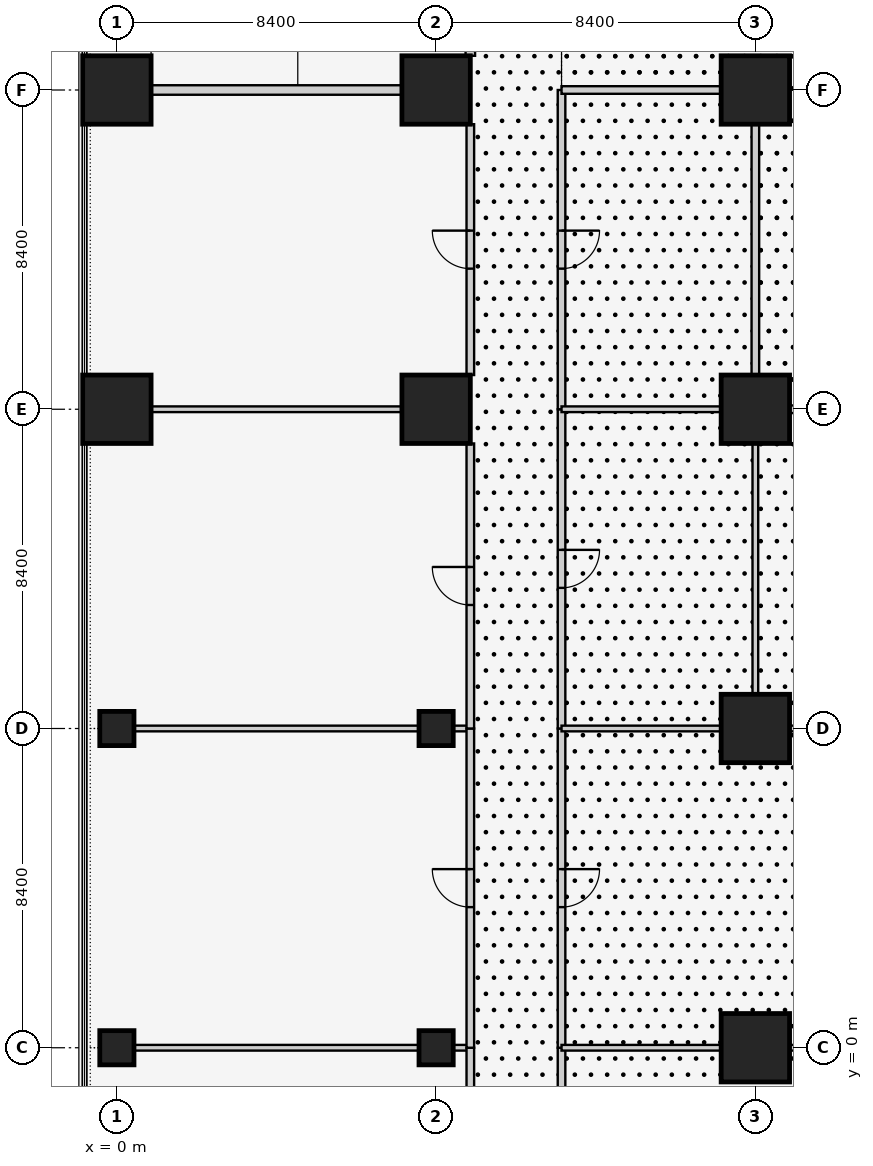
"""IFC4 building model, lengths in metres.
Left out: names, types, materials, properties, quantities, classifications, styles, units other than length and angle.
Written with IfcOpenShell. Run it as: python <this file> out.ifc"""

import sys

from ifc_helpers import new_model, si_unit, direction, frame, frame_2d, origin, origin_2d, place, context, subcontext, project, spatial, rectangle, extrude, element, fill, save


model = new_model("IFC4")
c1 = context("Model", 3, precision=1e-05, world=origin(), true_north=direction((0.0, 1.0)))
c2 = subcontext(c1, "Body", "Model", "MODEL_VIEW")
j1 = project(units=[si_unit("LENGTHUNIT", "METRE"), si_unit("PLANEANGLEUNIT", "RADIAN")], contexts=[c1])
p1 = place(None, origin())
s1 = spatial("IfcSite", under=j1, at=p1, CompositionType="ELEMENT")
p2 = place(p1, origin())
s2 = spatial("IfcBuilding", under=s1, at=p2, CompositionType="ELEMENT")
p3 = place(p2, frame((0.0, 0.0, 6.0)))
s3 = spatial("IfcBuildingStorey", under=s2, at=p3, CompositionType="ELEMENT", Elevation=6.0)
for number, where, z_axis, x_axis in (
    (1, (0.0, 0.0, 0.0), (0.0, 0.0, 1.0), (1.0, 0.0, 0.0)),
    (2, (0.0, 8.4, 0.0), (0.0, 0.0, 1.0), (1.0, 0.0, 0.0)),
):
    element("IfcColumn", number, at=place(p3, frame(where, z_axis=z_axis, x_axis=x_axis)), inside=s3, PredefinedType="COLUMN", context=c2, shape_type="SweptSolid", body=[
        extrude(rectangle(XDim=0.9, YDim=0.9, at=origin_2d()), origin(), (0.0, 0.0, 1.0), 4.5),
    ])
for number, where, z_axis, x_axis in (
    (3, (0.0, 16.8, 0.0), (0.0, 0.0, 1.0), (1.0, 0.0, 0.0)),
    (4, (0.0, 25.2, 0.0), (0.0, 0.0, 1.0), (1.0, 0.0, 0.0)),
):
    element("IfcColumn", number, at=place(p3, frame(where, z_axis=z_axis, x_axis=x_axis)), inside=s3, PredefinedType="COLUMN", context=c2, shape_type="SweptSolid", body=[
        extrude(rectangle(XDim=1.8, YDim=1.8, at=origin_2d()), origin(), (0.0, 0.0, 1.0), 4.5),
    ])
for number, where, z_axis, x_axis in (
    (5, (8.4, 0.0, 0.0), (0.0, 0.0, 1.0), (1.0, 0.0, 0.0)),
    (6, (8.4, 8.4, 0.0), (0.0, 0.0, 1.0), (1.0, 0.0, 0.0)),
):
    element("IfcColumn", number, at=place(p3, frame(where, z_axis=z_axis, x_axis=x_axis)), inside=s3, PredefinedType="COLUMN", context=c2, shape_type="SweptSolid", body=[
        extrude(rectangle(XDim=0.9, YDim=0.9, at=origin_2d()), origin(), (0.0, 0.0, 1.0), 4.5),
    ])
for number, where, z_axis, x_axis in (
    (7, (8.4, 16.8, 0.0), (0.0, 0.0, 1.0), (1.0, 0.0, 0.0)),
    (8, (8.4, 25.2, 0.0), (0.0, 0.0, 1.0), (1.0, 0.0, 0.0)),
    (9, (16.8, 0.0, 0.0), (0.0, 0.0, 1.0), (1.0, 0.0, 0.0)),
    (10, (16.8, 8.4, 0.0), (0.0, 0.0, 1.0), (1.0, 0.0, 0.0)),
    (11, (16.8, 16.8, 0.0), (0.0, 0.0, 1.0), (1.0, 0.0, 0.0)),
    (12, (16.8, 25.2, 0.0), (0.0, 0.0, 1.0), (1.0, 0.0, 0.0)),
):
    element("IfcColumn", number, at=place(p3, frame(where, z_axis=z_axis, x_axis=x_axis)), inside=s3, PredefinedType="COLUMN", context=c2, shape_type="SweptSolid", body=[
        extrude(rectangle(XDim=1.8, YDim=1.8, at=origin_2d()), origin(), (0.0, 0.0, 1.0), 4.5),
    ])
p4 = place(p3, frame((7.5, 25.2, 0.0), z_axis=(0.0, 0.0, 1.0), x_axis=(-1.0, 0.0, 0.0)))
e13 = element("IfcWall", 13, at=p4, inside=s3, PredefinedType="SOLIDWALL", context=c2, shape_type="SweptSolid", body=[
    extrude(rectangle(XDim=6.6, YDim=0.25, at=frame_2d((3.3, 0.0))), origin(), (0.0, 0.0, 1.0), 3.543),
])
p5 = place(p3, frame((9.3, 32.7, 0.0), z_axis=(0.0, 0.0, 1.0), x_axis=(0.0, -1.0, 0.0)))
e14 = element("IfcWall", 14, at=p5, inside=s3, PredefinedType="SOLIDWALL", context=c2, shape_type="SweptSolid", body=[
    extrude(rectangle(XDim=6.6, YDim=0.25, at=frame_2d((3.3, 0.0))), origin(), (0.0, 0.0, 1.0), 4.3),
])
p6 = place(p5, frame((2.0, 0.0, 0.0)))
e15 = element("IfcOpeningElement", 15, at=p6, cuts=e14, PredefinedType="OPENING", context=c2, shape_type="SweptSolid", body=[
    extrude(rectangle(XDim=2.6, YDim=2.4, at=frame_2d((1.3, 1.2))), frame((0.0, 0.135, 0.0), z_axis=(0.0, -1.0, 0.0), x_axis=(1.0, 0.0, 0.0)), (0.0, 0.0, 1.0), 0.27),
])
p7 = place(p3, frame((0.45, 0.0, 0.0), z_axis=(0.0, 0.0, 1.0), x_axis=(1.0, 0.0, 0.0)))
e16 = element("IfcWall", 16, at=p7, inside=s3, PredefinedType="PARTITIONING", context=c2, shape_type="SweptSolid", body=[
    extrude(rectangle(XDim=7.5, YDim=0.15, at=frame_2d((3.75, 0.0))), origin(), (0.0, 0.0, 1.0), 3.543),
])
p8 = place(p3, frame((8.85, 0.0, 0.0), z_axis=(0.0, 0.0, 1.0), x_axis=(1.0, 0.0, 0.0)))
e17 = element("IfcWall", 17, at=p8, inside=s3, PredefinedType="PARTITIONING", context=c2, shape_type="SweptSolid", body=[
    extrude(rectangle(XDim=0.45, YDim=0.15, at=frame_2d((0.225, 0.0))), origin(), (0.0, 0.0, 1.0), 3.543),
])
p9 = place(p3, frame((9.3, 0.0, 0.0), z_axis=(0.0, 0.0, 1.0), x_axis=(0.0, -1.0, 0.0)))
e18 = element("IfcWall", 18, at=p9, inside=s3, PredefinedType="PARTITIONING", context=c2, shape_type="SweptSolid", body=[
    extrude(rectangle(XDim=8.4, YDim=0.2, at=frame_2d((4.2, 0.0))), origin(), (0.0, 0.0, 1.0), 4.3),
])
p10 = place(p9, frame((3.7, 0.0, 0.0)))
e19 = element("IfcOpeningElement", 19, at=p10, cuts=e18, PredefinedType="OPENING", context=c2, shape_type="SweptSolid", body=[
    extrude(rectangle(XDim=1.0, YDim=2.1, at=frame_2d((0.5, 1.05))), frame((0.0, 0.11, 0.0), z_axis=(0.0, -1.0, 0.0), x_axis=(1.0, 0.0, 0.0)), (0.0, 0.0, 1.0), 0.22),
])
p11 = place(p3, frame((0.45, 8.4, 0.0), z_axis=(0.0, 0.0, 1.0), x_axis=(1.0, 0.0, 0.0)))
e20 = element("IfcWall", 20, at=p11, inside=s3, PredefinedType="PARTITIONING", context=c2, shape_type="SweptSolid", body=[
    extrude(rectangle(XDim=7.5, YDim=0.15, at=frame_2d((3.75, 0.0))), origin(), (0.0, 0.0, 1.0), 3.543),
])
p12 = place(p3, frame((8.85, 8.4, 0.0), z_axis=(0.0, 0.0, 1.0), x_axis=(1.0, 0.0, 0.0)))
e21 = element("IfcWall", 21, at=p12, inside=s3, PredefinedType="PARTITIONING", context=c2, shape_type="SweptSolid", body=[
    extrude(rectangle(XDim=0.45, YDim=0.15, at=frame_2d((0.225, 0.0))), origin(), (0.0, 0.0, 1.0), 3.543),
])
p13 = place(p3, frame((9.3, 8.4, 0.0), z_axis=(0.0, 0.0, 1.0), x_axis=(0.0, -1.0, 0.0)))
e22 = element("IfcWall", 22, at=p13, inside=s3, PredefinedType="PARTITIONING", context=c2, shape_type="SweptSolid", body=[
    extrude(rectangle(XDim=8.4, YDim=0.2, at=frame_2d((4.2, 0.0))), origin(), (0.0, 0.0, 1.0), 4.3),
])
p14 = place(p13, frame((3.7, 0.0, 0.0)))
e23 = element("IfcOpeningElement", 23, at=p14, cuts=e22, PredefinedType="OPENING", context=c2, shape_type="SweptSolid", body=[
    extrude(rectangle(XDim=1.0, YDim=2.1, at=frame_2d((0.5, 1.05))), frame((0.0, 0.11, 0.0), z_axis=(0.0, -1.0, 0.0), x_axis=(1.0, 0.0, 0.0)), (0.0, 0.0, 1.0), 0.22),
])
p15 = place(p3, frame((0.9, 16.8, 0.0), z_axis=(0.0, 0.0, 1.0), x_axis=(1.0, 0.0, 0.0)))
e24 = element("IfcWall", 24, at=p15, inside=s3, PredefinedType="PARTITIONING", context=c2, shape_type="SweptSolid", body=[
    extrude(rectangle(XDim=6.6, YDim=0.15, at=frame_2d((3.3, 0.0))), origin(), (0.0, 0.0, 1.0), 3.543),
])
p16 = place(p3, frame((9.3, 15.9, 0.0), z_axis=(0.0, 0.0, 1.0), x_axis=(0.0, -1.0, 0.0)))
e25 = element("IfcWall", 25, at=p16, inside=s3, PredefinedType="PARTITIONING", context=c2, shape_type="SweptSolid", body=[
    extrude(rectangle(XDim=7.5, YDim=0.2, at=frame_2d((3.75, 0.0))), origin(), (0.0, 0.0, 1.0), 4.3),
])
p17 = place(p16, frame((3.25, 0.0, 0.0)))
e26 = element("IfcOpeningElement", 26, at=p17, cuts=e25, PredefinedType="OPENING", context=c2, shape_type="SweptSolid", body=[
    extrude(rectangle(XDim=1.0, YDim=2.1, at=frame_2d((0.5, 1.05))), frame((0.0, 0.11, 0.0), z_axis=(0.0, -1.0, 0.0), x_axis=(1.0, 0.0, 0.0)), (0.0, 0.0, 1.0), 0.22),
])
p18 = place(p3, frame((9.3, 24.3, 0.0), z_axis=(0.0, 0.0, 1.0), x_axis=(0.0, -1.0, 0.0)))
e27 = element("IfcWall", 27, at=p18, inside=s3, PredefinedType="PARTITIONING", context=c2, shape_type="SweptSolid", body=[
    extrude(rectangle(XDim=6.6, YDim=0.2, at=frame_2d((3.3, 0.0))), origin(), (0.0, 0.0, 1.0), 4.3),
])
p19 = place(p18, frame((2.8, 0.0, 0.0)))
e28 = element("IfcOpeningElement", 28, at=p19, cuts=e27, PredefinedType="OPENING", context=c2, shape_type="SweptSolid", body=[
    extrude(rectangle(XDim=1.0, YDim=2.1, at=frame_2d((0.5, 1.05))), frame((0.0, 0.11, 0.0), z_axis=(0.0, -1.0, 0.0), x_axis=(1.0, 0.0, 0.0)), (0.0, 0.0, 1.0), 0.22),
])
p20 = place(p3, frame((11.7, 0.0, 0.0), z_axis=(0.0, 0.0, 1.0), x_axis=(0.0, -1.0, 0.0)))
e29 = element("IfcWall", 29, at=p20, inside=s3, PredefinedType="PARTITIONING", context=c2, shape_type="SweptSolid", body=[
    extrude(rectangle(XDim=5.1, YDim=0.2, at=frame_2d((2.55, 0.0))), origin(), (0.0, 0.0, 1.0), 4.3),
])
p21 = place(p3, frame((11.7, 8.4, 0.0), z_axis=(0.0, 0.0, 1.0), x_axis=(0.0, -1.0, 0.0)))
e30 = element("IfcWall", 30, at=p21, inside=s3, PredefinedType="PARTITIONING", context=c2, shape_type="SweptSolid", body=[
    extrude(rectangle(XDim=8.4, YDim=0.2, at=frame_2d((4.2, 0.0))), origin(), (0.0, 0.0, 1.0), 4.3),
])
p22 = place(p21, frame((3.7, 0.0, 0.0)))
e31 = element("IfcOpeningElement", 31, at=p22, cuts=e30, PredefinedType="OPENING", context=c2, shape_type="SweptSolid", body=[
    extrude(rectangle(XDim=1.0, YDim=2.1, at=frame_2d((0.5, 1.05))), frame((0.0, 0.11, 0.0), z_axis=(0.0, -1.0, 0.0), x_axis=(1.0, 0.0, 0.0)), (0.0, 0.0, 1.0), 0.22),
])
p23 = place(p3, frame((11.7, 16.8, 0.0), z_axis=(0.0, 0.0, 1.0), x_axis=(0.0, -1.0, 0.0)))
e32 = element("IfcWall", 32, at=p23, inside=s3, PredefinedType="PARTITIONING", context=c2, shape_type="SweptSolid", body=[
    extrude(rectangle(XDim=8.4, YDim=0.2, at=frame_2d((4.2, 0.0))), origin(), (0.0, 0.0, 1.0), 4.3),
])
p24 = place(p23, frame((3.7, 0.0, 0.0)))
e33 = element("IfcOpeningElement", 33, at=p24, cuts=e32, PredefinedType="OPENING", context=c2, shape_type="SweptSolid", body=[
    extrude(rectangle(XDim=1.0, YDim=2.1, at=frame_2d((0.5, 1.05))), frame((0.0, 0.11, 0.0), z_axis=(0.0, -1.0, 0.0), x_axis=(1.0, 0.0, 0.0)), (0.0, 0.0, 1.0), 0.22),
])
p25 = place(p3, frame((11.7, 25.2, 0.0), z_axis=(0.0, 0.0, 1.0), x_axis=(0.0, -1.0, 0.0)))
e34 = element("IfcWall", 34, at=p25, inside=s3, PredefinedType="PARTITIONING", context=c2, shape_type="SweptSolid", body=[
    extrude(rectangle(XDim=8.4, YDim=0.2, at=frame_2d((4.2, 0.0))), origin(), (0.0, 0.0, 1.0), 4.3),
])
p26 = place(p25, frame((3.7, 0.0, 0.0)))
e35 = element("IfcOpeningElement", 35, at=p26, cuts=e34, PredefinedType="OPENING", context=c2, shape_type="SweptSolid", body=[
    extrude(rectangle(XDim=1.0, YDim=2.1, at=frame_2d((0.5, 1.05))), frame((0.0, 0.11, 0.0), z_axis=(0.0, -1.0, 0.0), x_axis=(1.0, 0.0, 0.0)), (0.0, 0.0, 1.0), 0.22),
])
p27 = place(p3, frame((24.3, 16.8, 0.0), z_axis=(0.0, 0.0, 1.0), x_axis=(-1.0, 0.0, 0.0)))
e36 = element("IfcWall", 36, at=p27, inside=s3, PredefinedType="PARTITIONING", context=c2, shape_type="SweptSolid", body=[
    extrude(rectangle(XDim=6.6, YDim=0.2, at=frame_2d((3.3, 0.0))), origin(), (0.0, 0.0, 1.0), 3.543),
])
p28 = place(p3, frame((15.9, 25.2, 0.0), z_axis=(0.0, 0.0, 1.0), x_axis=(-1.0, 0.0, 0.0)))
e37 = element("IfcWall", 37, at=p28, inside=s3, PredefinedType="PARTITIONING", context=c2, shape_type="SweptSolid", body=[
    extrude(rectangle(XDim=4.2, YDim=0.2, at=frame_2d((2.1, 0.0))), origin(), (0.0, 0.0, 1.0), 3.543),
])
p29 = place(p3, frame((16.8, 17.7, 0.0), z_axis=(0.0, 0.0, 1.0), x_axis=(0.0, 1.0, 0.0)))
e38 = element("IfcWall", 38, at=p29, inside=s3, PredefinedType="PARTITIONING", context=c2, shape_type="SweptSolid", body=[
    extrude(rectangle(XDim=6.6, YDim=0.2, at=frame_2d((3.3, 0.0))), origin(), (0.0, 0.0, 1.0), 3.543),
])
p30 = place(p3, frame((11.7, 0.0, 0.0), z_axis=(0.0, 0.0, 1.0), x_axis=(1.0, 0.0, 0.0)))
e39 = element("IfcWall", 39, at=p30, inside=s3, PredefinedType="PARTITIONING", context=c2, shape_type="SweptSolid", body=[
    extrude(rectangle(XDim=4.2, YDim=0.15, at=frame_2d((2.1, 0.0))), origin(), (0.0, 0.0, 1.0), 3.543),
])
p31 = place(p3, frame((17.7, 0.0, 0.0), z_axis=(0.0, 0.0, 1.0), x_axis=(1.0, 0.0, 0.0)))
e40 = element("IfcWall", 40, at=p31, inside=s3, PredefinedType="PARTITIONING", context=c2, shape_type="SweptSolid", body=[
    extrude(rectangle(XDim=6.6, YDim=0.15, at=frame_2d((3.3, 0.0))), origin(), (0.0, 0.0, 1.0), 3.543),
])
p32 = place(p3, frame((11.7, 8.4, 0.0), z_axis=(0.0, 0.0, 1.0), x_axis=(1.0, 0.0, 0.0)))
e41 = element("IfcWall", 41, at=p32, inside=s3, PredefinedType="PARTITIONING", context=c2, shape_type="SweptSolid", body=[
    extrude(rectangle(XDim=4.2, YDim=0.15, at=frame_2d((2.1, 0.0))), origin(), (0.0, 0.0, 1.0), 3.543),
])
p33 = place(p3, frame((17.7, 8.4, 0.0), z_axis=(0.0, 0.0, 1.0), x_axis=(1.0, 0.0, 0.0)))
e42 = element("IfcWall", 42, at=p33, inside=s3, PredefinedType="PARTITIONING", context=c2, shape_type="SweptSolid", body=[
    extrude(rectangle(XDim=6.6, YDim=0.15, at=frame_2d((3.3, 0.0))), origin(), (0.0, 0.0, 1.0), 3.543),
])
p34 = place(p3, frame((16.8, 15.9, 0.0), z_axis=(0.0, 0.0, 1.0), x_axis=(0.0, -1.0, 0.0)))
e43 = element("IfcWall", 43, at=p34, inside=s3, PredefinedType="PARTITIONING", context=c2, shape_type="SweptSolid", body=[
    extrude(rectangle(XDim=6.6, YDim=0.15, at=frame_2d((3.3, 0.0))), origin(), (0.0, 0.0, 1.0), 3.543),
])
p35 = place(p3, frame((11.7, 16.8, 0.0), z_axis=(0.0, 0.0, 1.0), x_axis=(1.0, 0.0, 0.0)))
e44 = element("IfcWall", 44, at=p35, inside=s3, PredefinedType="PARTITIONING", context=c2, shape_type="SweptSolid", body=[
    extrude(rectangle(XDim=4.2, YDim=0.15, at=frame_2d((2.1, 0.0))), origin(), (0.0, 0.0, 1.0), 3.543),
])
p36 = place(p14, frame((1.0, 0.0, 0.0), z_axis=(0.0, 0.0, 1.0), x_axis=(-1.0, 0.0, 0.0)))
e45 = element("IfcDoor", 45, at=p36, inside=s3, OperationType="SINGLE_SWING_RIGHT", PredefinedType="DOOR", context=c2, shape_type="SweptSolid", body=[
    extrude(rectangle(XDim=1.0, YDim=2.1, at=frame_2d((0.5, 1.05))), frame((0.0, 0.025, 0.0), z_axis=(0.0, -1.0, 0.0), x_axis=(1.0, 0.0, 0.0)), (0.0, 0.0, 1.0), 0.05),
])
fill(e23, e45)
p37 = place(p17, frame((1.0, 0.0, 0.0), z_axis=(0.0, 0.0, 1.0), x_axis=(-1.0, 0.0, 0.0)))
e46 = element("IfcDoor", 46, at=p37, inside=s3, OperationType="SINGLE_SWING_RIGHT", PredefinedType="DOOR", context=c2, shape_type="SweptSolid", body=[
    extrude(rectangle(XDim=1.0, YDim=2.1, at=frame_2d((0.5, 1.05))), frame((0.0, 0.025, 0.0), z_axis=(0.0, -1.0, 0.0), x_axis=(1.0, 0.0, 0.0)), (0.0, 0.0, 1.0), 0.05),
])
fill(e26, e46)
p38 = place(p19, frame((1.0, 0.0, 0.0), z_axis=(0.0, 0.0, 1.0), x_axis=(-1.0, 0.0, 0.0)))
e47 = element("IfcDoor", 47, at=p38, inside=s3, OperationType="SINGLE_SWING_RIGHT", PredefinedType="DOOR", context=c2, shape_type="SweptSolid", body=[
    extrude(rectangle(XDim=1.0, YDim=2.1, at=frame_2d((0.5, 1.05))), frame((0.0, 0.025, 0.0), z_axis=(0.0, -1.0, 0.0), x_axis=(1.0, 0.0, 0.0)), (0.0, 0.0, 1.0), 0.05),
])
fill(e28, e47)
p39 = place(p22, origin())
e48 = element("IfcDoor", 48, at=p39, inside=s3, OperationType="SINGLE_SWING_LEFT", PredefinedType="DOOR", context=c2, shape_type="SweptSolid", body=[
    extrude(rectangle(XDim=1.0, YDim=2.1, at=frame_2d((0.5, 1.05))), frame((0.0, 0.025, 0.0), z_axis=(0.0, -1.0, 0.0), x_axis=(1.0, 0.0, 0.0)), (0.0, 0.0, 1.0), 0.05),
])
fill(e31, e48)
p40 = place(p24, origin())
e49 = element("IfcDoor", 49, at=p40, inside=s3, OperationType="SINGLE_SWING_LEFT", PredefinedType="DOOR", context=c2, shape_type="SweptSolid", body=[
    extrude(rectangle(XDim=1.0, YDim=2.1, at=frame_2d((0.5, 1.05))), frame((0.0, 0.025, 0.0), z_axis=(0.0, -1.0, 0.0), x_axis=(1.0, 0.0, 0.0)), (0.0, 0.0, 1.0), 0.05),
])
fill(e33, e49)
p41 = place(p26, origin())
e50 = element("IfcDoor", 50, at=p41, inside=s3, OperationType="SINGLE_SWING_LEFT", PredefinedType="DOOR", context=c2, shape_type="SweptSolid", body=[
    extrude(rectangle(XDim=1.0, YDim=2.1, at=frame_2d((0.5, 1.05))), frame((0.0, 0.025, 0.0), z_axis=(0.0, -1.0, 0.0), x_axis=(1.0, 0.0, 0.0)), (0.0, 0.0, 1.0), 0.05),
])
fill(e35, e50)
save(model, sys.argv[1])
